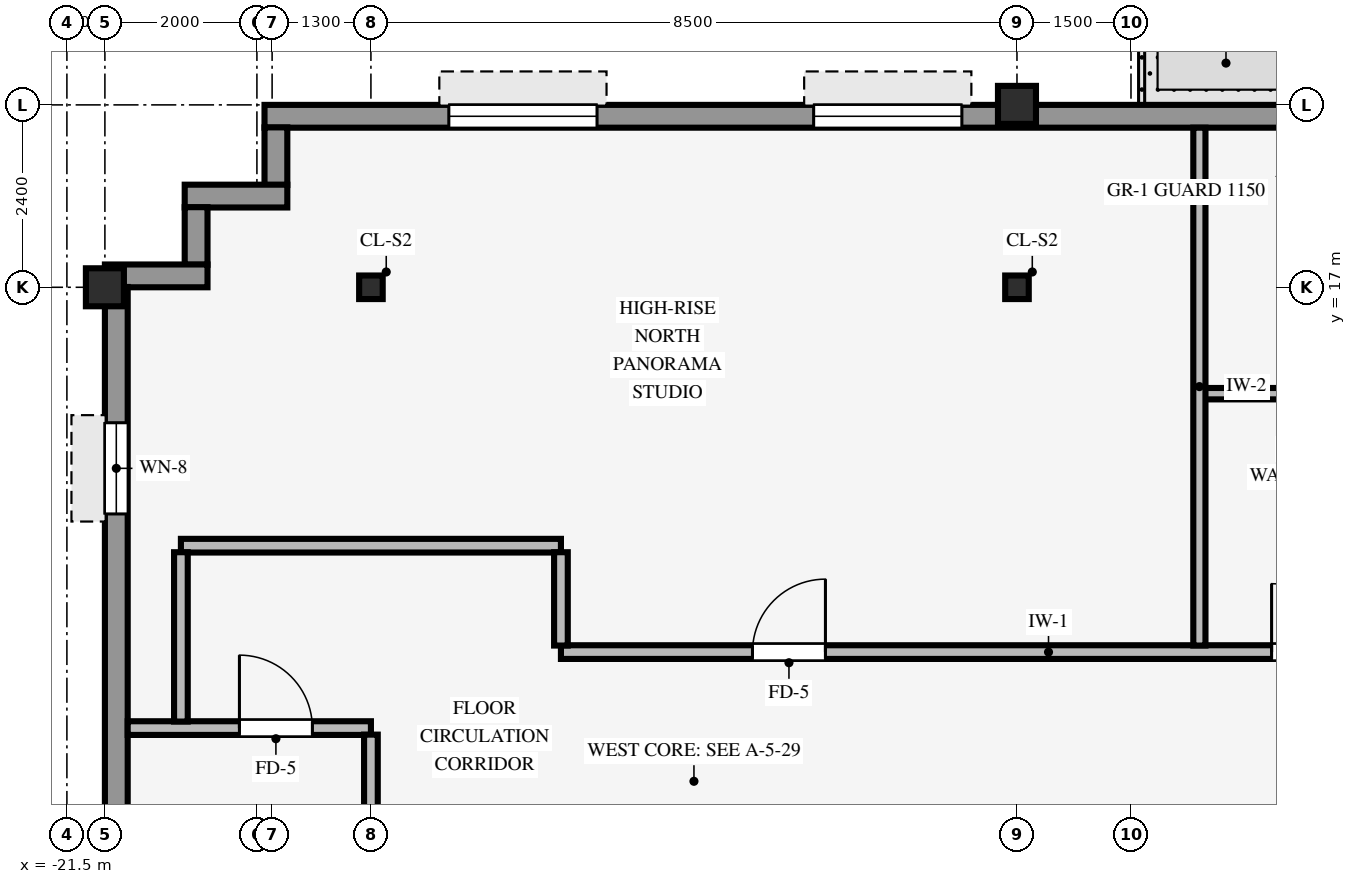
"""IFC4 building model, lengths in metres.
Left out: names, types, materials, properties, quantities, classifications, styles, units other than length and angle.
Written with IfcOpenShell. Run it as: python <this file> out.ifc"""

import sys

from ifc_helpers import new_model, si_unit, direction, frame, frame_2d, origin, origin_2d, place, context, subcontext, project, spatial, rectangle, hollow_rectangle, i_section, extrude, source, transform, mapped, element, fill, save


model = new_model("IFC4")
c1 = context("Model", 3, precision=1e-05, world=origin(), true_north=direction((0.0, 1.0)))
c2 = subcontext(c1, "Body", "Model", "MODEL_VIEW")
j1 = project(units=[si_unit("LENGTHUNIT", "METRE"), si_unit("PLANEANGLEUNIT", "RADIAN")], contexts=[c1])
p1 = place(None, origin())
s1 = spatial("IfcSite", under=j1, at=p1, CompositionType="ELEMENT")
p2 = place(p1, origin())
s2 = spatial("IfcBuilding", under=s1, at=p2, CompositionType="ELEMENT")
p3 = place(p2, frame((0.0, 0.0, 245.65)))
s3 = spatial("IfcBuildingStorey", under=s2, at=p3, CompositionType="ELEMENT", Elevation=245.65)
p4 = place(p3, frame((-21.0, 17.0, -0.4), z_axis=(0.0, 0.0, 1.0), x_axis=(1.0, 0.0, 0.0)))
e1 = element("IfcColumn", 1, at=p4, inside=s3, PredefinedType="COLUMN", context=c2, shape_type="SweptSolid", body=[
    extrude(hollow_rectangle(XDim=0.5, YDim=0.5, WallThickness=0.032, InnerFilletRadius=0.032, OuterFilletRadius=0.064, at=origin_2d()), origin(), (0.0, 0.0, 1.0), 3.77),
])
p5 = place(p3, frame((-9.0, 19.4, 0.0), z_axis=(0.0, 0.0, 1.0), x_axis=(1.0, 0.0, 0.0)))
e2 = element("IfcColumn", 2, at=p5, inside=s3, PredefinedType="COLUMN", context=c2, shape_type="SweptSolid", body=[
    extrude(hollow_rectangle(XDim=0.5, YDim=0.5, WallThickness=0.032, InnerFilletRadius=0.032, OuterFilletRadius=0.064, at=origin_2d()), origin(), (0.0, 0.0, 1.0), 3.37),
])
for number, where, z_axis, x_axis in (
    (3, (-17.5, 17.0, 0.0), (0.0, 0.0, 1.0), (1.0, 0.0, 0.0)),
    (4, (-9.0, 17.0, 0.0), (0.0, 0.0, 1.0), (1.0, 0.0, 0.0)),
):
    element("IfcColumn", number, at=place(p3, frame(where, z_axis=z_axis, x_axis=x_axis)), inside=s3, PredefinedType="COLUMN", context=c2, shape_type="SweptSolid", body=[
        extrude(i_section(OverallWidth=0.31, OverallDepth=0.31, WebThickness=0.015, FlangeThickness=0.015, FilletRadius=0.015, at=origin_2d()), origin(), (0.0, 0.0, 1.0), 3.37),
    ])
p6 = place(p3, frame((-18.9, 19.25, 0.0), z_axis=(0.0, 0.0, 1.0), x_axis=(1.0, 0.0, 0.0)))
e5 = element("IfcWall", 5, at=p6, inside=s3, PredefinedType="STANDARD", context=c2, shape_type="SweptSolid", body=[
    extrude(rectangle(XDim=35.6, YDim=0.3, at=frame_2d((17.8, 0.0))), origin(), (0.0, 0.0, 1.0), 2.705),
])
p7 = place(p6, frame((13.6, 0.0, 0.0)))
e6 = element("IfcOpeningElement", 6, at=p7, cuts=e5, PredefinedType="OPENING", context=c2, shape_type="SweptSolid", body=[
    extrude(rectangle(XDim=0.98, YDim=2.15, at=frame_2d((0.49, 1.075))), frame((0.0, 0.16, 0.0), z_axis=(0.0, -1.0, 0.0), x_axis=(1.0, 0.0, 0.0)), (0.0, 0.0, 1.0), 0.32),
])
p8 = place(p6, frame((2.425, 0.0, 0.8)))
e7 = element("IfcOpeningElement", 7, at=p8, cuts=e5, PredefinedType="OPENING", context=c2, shape_type="SweptSolid", body=[
    extrude(rectangle(XDim=1.95, YDim=1.48, at=frame_2d((0.975, 0.74))), frame((0.0, 0.16, 0.0), z_axis=(0.0, -1.0, 0.0), x_axis=(1.0, 0.0, 0.0)), (0.0, 0.0, 1.0), 0.32),
])
p9 = place(p6, frame((7.225, 0.0, 0.8)))
e8 = element("IfcOpeningElement", 8, at=p9, cuts=e5, PredefinedType="OPENING", context=c2, shape_type="SweptSolid", body=[
    extrude(rectangle(XDim=1.95, YDim=1.48, at=frame_2d((0.975, 0.74))), frame((0.0, 0.16, 0.0), z_axis=(0.0, -1.0, 0.0), x_axis=(1.0, 0.0, 0.0)), (0.0, 0.0, 1.0), 0.32),
])
p10 = place(p6, frame((15.925, 0.0, 0.8)))
e9 = element("IfcOpeningElement", 9, at=p10, cuts=e5, PredefinedType="OPENING", context=c2, shape_type="SweptSolid", body=[
    extrude(rectangle(XDim=1.95, YDim=1.48, at=frame_2d((0.975, 0.74))), frame((0.0, 0.16, 0.0), z_axis=(0.0, -1.0, 0.0), x_axis=(1.0, 0.0, 0.0)), (0.0, 0.0, 1.0), 0.32),
])
p11 = place(p6, frame((21.625, 0.0, 0.8)))
e10 = element("IfcOpeningElement", 10, at=p11, cuts=e5, PredefinedType="OPENING", context=c2, shape_type="SweptSolid", body=[
    extrude(rectangle(XDim=1.95, YDim=1.48, at=frame_2d((0.975, 0.74))), frame((0.0, 0.16, 0.0), z_axis=(0.0, -1.0, 0.0), x_axis=(1.0, 0.0, 0.0)), (0.0, 0.0, 1.0), 0.32),
])
p12 = place(p6, frame((32.125, 0.0, 0.8)))
e11 = element("IfcOpeningElement", 11, at=p12, cuts=e5, PredefinedType="OPENING", context=c2, shape_type="SweptSolid", body=[
    extrude(rectangle(XDim=1.95, YDim=1.48, at=frame_2d((0.975, 0.74))), frame((0.0, 0.16, 0.0), z_axis=(0.0, -1.0, 0.0), x_axis=(1.0, 0.0, 0.0)), (0.0, 0.0, 1.0), 0.32),
])
p13 = place(p3, frame((-18.75, 18.346, 0.0), z_axis=(0.0, 0.0, 1.0), x_axis=(0.0, 1.0, 0.0)))
e12 = element("IfcWall", 12, at=p13, inside=s3, PredefinedType="STANDARD", context=c2, shape_type="SweptSolid", body=[
    extrude(rectangle(XDim=0.758, YDim=0.3, at=frame_2d((0.379, 0.0))), origin(), (0.0, 0.0, 1.0), 2.892),
])
p14 = place(p3, frame((-19.95, 18.2, 0.0), z_axis=(0.0, 0.0, 1.0), x_axis=(1.0, 0.0, 0.0)))
e13 = element("IfcWall", 13, at=p14, inside=s3, PredefinedType="STANDARD", context=c2, shape_type="SweptSolid", body=[
    extrude(rectangle(XDim=1.35, YDim=0.3, at=frame_2d((0.675, 0.0))), origin(), (0.0, 0.0, 1.0), 2.892),
])
p15 = place(p3, frame((-19.8, 17.296, 0.0), z_axis=(0.0, 0.0, 1.0), x_axis=(0.0, 1.0, 0.0)))
e14 = element("IfcWall", 14, at=p15, inside=s3, PredefinedType="STANDARD", context=c2, shape_type="SweptSolid", body=[
    extrude(rectangle(XDim=0.758, YDim=0.3, at=frame_2d((0.379, 0.0))), origin(), (0.0, 0.0, 1.0), 2.892),
])
p16 = place(p3, frame((-21.0, 17.15, 0.0), z_axis=(0.0, 0.0, 1.0), x_axis=(1.0, 0.0, 0.0)))
e15 = element("IfcWall", 15, at=p16, inside=s3, PredefinedType="STANDARD", context=c2, shape_type="SweptSolid", body=[
    extrude(rectangle(XDim=1.35, YDim=0.3, at=frame_2d((0.675, 0.0))), origin(), (0.0, 0.0, 1.0), 2.892),
])
p17 = place(p3, frame((-20.85, -17.004, 0.0), z_axis=(0.0, 0.0, 1.0), x_axis=(0.0, 1.0, 0.0)))
e16 = element("IfcWall", 16, at=p17, inside=s3, PredefinedType="STANDARD", context=c2, shape_type="SweptSolid", body=[
    extrude(rectangle(XDim=34.008, YDim=0.3, at=frame_2d((17.004, 0.0))), origin(), (0.0, 0.0, 1.0), 2.705),
])
p18 = place(p17, frame((11.754, 0.0, 0.0)))
e17 = element("IfcOpeningElement", 17, at=p18, cuts=e16, PredefinedType="OPENING", context=c2, shape_type="SweptSolid", body=[
    extrude(rectangle(XDim=1.05, YDim=2.1, at=frame_2d((0.525, 1.05))), frame((0.0, 0.16, 0.0), z_axis=(0.0, -1.0, 0.0), x_axis=(1.0, 0.0, 0.0)), (0.0, 0.0, 1.0), 0.32),
])
p19 = place(p17, frame((1.786, 0.0, 0.8)))
e18 = element("IfcOpeningElement", 18, at=p19, cuts=e16, PredefinedType="OPENING", context=c2, shape_type="SweptSolid", body=[
    extrude(rectangle(XDim=1.2, YDim=1.48, at=frame_2d((0.6, 0.74))), frame((0.0, 0.16, 0.0), z_axis=(0.0, -1.0, 0.0), x_axis=(1.0, 0.0, 0.0)), (0.0, 0.0, 1.0), 0.32),
])
p20 = place(p17, frame((8.159, 0.0, 0.8)))
e19 = element("IfcOpeningElement", 19, at=p20, cuts=e16, PredefinedType="OPENING", context=c2, shape_type="SweptSolid", body=[
    extrude(rectangle(XDim=1.2, YDim=1.48, at=frame_2d((0.6, 0.74))), frame((0.0, 0.16, 0.0), z_axis=(0.0, -1.0, 0.0), x_axis=(1.0, 0.0, 0.0)), (0.0, 0.0, 1.0), 0.32),
])
p21 = place(p17, frame((13.181, 0.0, 0.8)))
e20 = element("IfcOpeningElement", 20, at=p21, cuts=e16, PredefinedType="OPENING", context=c2, shape_type="SweptSolid", body=[
    extrude(rectangle(XDim=1.2, YDim=1.48, at=frame_2d((0.6, 0.74))), frame((0.0, 0.16, 0.0), z_axis=(0.0, -1.0, 0.0), x_axis=(1.0, 0.0, 0.0)), (0.0, 0.0, 1.0), 0.32),
])
p22 = place(p17, frame((17.754, 0.0, 0.8)))
e21 = element("IfcOpeningElement", 21, at=p22, cuts=e16, PredefinedType="OPENING", context=c2, shape_type="SweptSolid", body=[
    extrude(rectangle(XDim=1.2, YDim=1.48, at=frame_2d((0.6, 0.74))), frame((0.0, 0.16, 0.0), z_axis=(0.0, -1.0, 0.0), x_axis=(1.0, 0.0, 0.0)), (0.0, 0.0, 1.0), 0.32),
])
p23 = place(p17, frame((20.977, 0.0, 0.8)))
e22 = element("IfcOpeningElement", 22, at=p23, cuts=e16, PredefinedType="OPENING", context=c2, shape_type="SweptSolid", body=[
    extrude(rectangle(XDim=1.2, YDim=1.48, at=frame_2d((0.6, 0.74))), frame((0.0, 0.16, 0.0), z_axis=(0.0, -1.0, 0.0), x_axis=(1.0, 0.0, 0.0)), (0.0, 0.0, 1.0), 0.32),
])
p24 = place(p17, frame((24.649, 0.0, 0.8)))
e23 = element("IfcOpeningElement", 23, at=p24, cuts=e16, PredefinedType="OPENING", context=c2, shape_type="SweptSolid", body=[
    extrude(rectangle(XDim=1.2, YDim=1.48, at=frame_2d((0.6, 0.74))), frame((0.0, 0.16, 0.0), z_axis=(0.0, -1.0, 0.0), x_axis=(1.0, 0.0, 0.0)), (0.0, 0.0, 1.0), 0.32),
])
p25 = place(p17, frame((31.022, 0.0, 0.8)))
e24 = element("IfcOpeningElement", 24, at=p25, cuts=e16, PredefinedType="OPENING", context=c2, shape_type="SweptSolid", body=[
    extrude(rectangle(XDim=1.2, YDim=1.48, at=frame_2d((0.6, 0.74))), frame((0.0, 0.16, 0.0), z_axis=(0.0, -1.0, 0.0), x_axis=(1.0, 0.0, 0.0)), (0.0, 0.0, 1.0), 0.32),
])
p26 = place(p3, frame((-20.7, 11.2, 0.0), z_axis=(0.0, 0.0, 1.0), x_axis=(1.0, 0.0, 0.0)))
e25 = element("IfcWall", 25, at=p26, inside=s3, PredefinedType="PARTITIONING", context=c2, shape_type="SweptSolid", body=[
    extrude(rectangle(XDim=3.2, YDim=0.18, at=frame_2d((1.6, 0.0))), origin(), (0.0, 0.0, 1.0), 3.36),
])
p27 = place(p26, frame((1.47, 0.0, 0.0)))
e26 = element("IfcOpeningElement", 26, at=p27, cuts=e25, PredefinedType="OPENING", context=c2, shape_type="SweptSolid", body=[
    extrude(rectangle(XDim=0.96, YDim=2.1, at=frame_2d((0.48, 1.05))), frame((0.0, 0.1, 0.0), z_axis=(0.0, -1.0, 0.0), x_axis=(1.0, 0.0, 0.0)), (0.0, 0.0, 1.0), 0.2),
])
p28 = place(p3, frame((-15.0, 12.2, 0.0), z_axis=(0.0, 0.0, 1.0), x_axis=(1.0, 0.0, 0.0)))
e27 = element("IfcWall", 27, at=p28, inside=s3, PredefinedType="PARTITIONING", context=c2, shape_type="SweptSolid", body=[
    extrude(rectangle(XDim=30.8, YDim=0.18, at=frame_2d((15.4, 0.0))), origin(), (0.0, 0.0, 1.0), 3.36),
])
p29 = place(p28, frame((2.52, 0.0, 0.0)))
e28 = element("IfcOpeningElement", 28, at=p29, cuts=e27, PredefinedType="OPENING", context=c2, shape_type="SweptSolid", body=[
    extrude(rectangle(XDim=0.96, YDim=2.1, at=frame_2d((0.48, 1.05))), frame((0.0, 0.1, 0.0), z_axis=(0.0, -1.0, 0.0), x_axis=(1.0, 0.0, 0.0)), (0.0, 0.0, 1.0), 0.2),
])
p30 = place(p28, frame((19.22, 0.0, 0.0)))
e29 = element("IfcOpeningElement", 29, at=p30, cuts=e27, PredefinedType="OPENING", context=c2, shape_type="SweptSolid", body=[
    extrude(rectangle(XDim=0.96, YDim=2.1, at=frame_2d((0.48, 1.05))), frame((0.0, 0.1, 0.0), z_axis=(0.0, -1.0, 0.0), x_axis=(1.0, 0.0, 0.0)), (0.0, 0.0, 1.0), 0.2),
])
p31 = place(p28, frame((25.32, 0.0, 0.0)))
e30 = element("IfcOpeningElement", 30, at=p31, cuts=e27, PredefinedType="OPENING", context=c2, shape_type="SweptSolid", body=[
    extrude(rectangle(XDim=0.96, YDim=2.1, at=frame_2d((0.48, 1.05))), frame((0.0, 0.1, 0.0), z_axis=(0.0, -1.0, 0.0), x_axis=(1.0, 0.0, 0.0)), (0.0, 0.0, 1.0), 0.2),
])
p32 = place(p28, frame((28.72, 0.0, 0.0)))
e31 = element("IfcOpeningElement", 31, at=p32, cuts=e27, PredefinedType="OPENING", context=c2, shape_type="SweptSolid", body=[
    extrude(rectangle(XDim=0.96, YDim=2.1, at=frame_2d((0.48, 1.05))), frame((0.0, 0.1, 0.0), z_axis=(0.0, -1.0, 0.0), x_axis=(1.0, 0.0, 0.0)), (0.0, 0.0, 1.0), 0.2),
])
p33 = place(p28, frame((9.35, 0.0, 0.0)))
e32 = element("IfcOpeningElement", 32, at=p33, cuts=e27, PredefinedType="OPENING", context=c2, shape_type="SweptSolid", body=[
    extrude(rectangle(XDim=0.9, YDim=2.1, at=frame_2d((0.45, 1.05))), frame((0.0, 0.1, 0.0), z_axis=(0.0, -1.0, 0.0), x_axis=(1.0, 0.0, 0.0)), (0.0, 0.0, 1.0), 0.2),
])
p34 = place(p28, frame((12.15, 0.0, 0.0)))
e33 = element("IfcOpeningElement", 33, at=p34, cuts=e27, PredefinedType="OPENING", context=c2, shape_type="SweptSolid", body=[
    extrude(rectangle(XDim=0.9, YDim=2.1, at=frame_2d((0.45, 1.05))), frame((0.0, 0.1, 0.0), z_axis=(0.0, -1.0, 0.0), x_axis=(1.0, 0.0, 0.0)), (0.0, 0.0, 1.0), 0.2),
])
p35 = place(p28, frame((16.25, 0.0, 0.0)))
e34 = element("IfcOpeningElement", 34, at=p35, cuts=e27, PredefinedType="OPENING", context=c2, shape_type="SweptSolid", body=[
    extrude(rectangle(XDim=0.9, YDim=2.1, at=frame_2d((0.45, 1.05))), frame((0.0, 0.1, 0.0), z_axis=(0.0, -1.0, 0.0), x_axis=(1.0, 0.0, 0.0)), (0.0, 0.0, 1.0), 0.2),
])
p36 = place(p3, frame((-20.0, 13.6, 0.0), z_axis=(0.0, 0.0, 1.0), x_axis=(1.0, 0.0, 0.0)))
e35 = element("IfcWall", 35, at=p36, inside=s3, PredefinedType="PARTITIONING", context=c2, shape_type="SweptSolid", body=[
    extrude(rectangle(XDim=5.0, YDim=0.18, at=frame_2d((2.5, 0.0))), origin(), (0.0, 0.0, 1.0), 3.049),
])
p37 = place(p3, frame((-6.529, 15.6, 0.0), z_axis=(0.0, 0.0, 1.0), x_axis=(1.0, 0.0, 0.0)))
e36 = element("IfcWall", 36, at=p37, inside=s3, PredefinedType="PARTITIONING", context=c2, shape_type="SweptSolid", body=[
    extrude(rectangle(XDim=5.529, YDim=0.15, at=frame_2d((2.765, 0.0))), origin(), (0.0, 0.0, 1.0), 3.36),
])
p38 = place(p3, frame((-20.0, 11.286, 0.0), z_axis=(0.0, 0.0, 1.0), x_axis=(0.0, 1.0, 0.0)))
e37 = element("IfcWall", 37, at=p38, inside=s3, PredefinedType="PARTITIONING", context=c2, shape_type="SweptSolid", body=[
    extrude(rectangle(XDim=2.228, YDim=0.18, at=frame_2d((1.114, 0.0))), origin(), (0.0, 0.0, 1.0), 3.36),
])
p39 = place(p3, frame((-17.5, 9.996, 0.0), z_axis=(0.0, 0.0, 1.0), x_axis=(0.0, 1.0, 0.0)))
e38 = element("IfcWall", 38, at=p39, inside=s3, PredefinedType="PARTITIONING", context=c2, shape_type="SweptSolid", body=[
    extrude(rectangle(XDim=1.118, YDim=0.18, at=frame_2d((0.559, 0.0))), origin(), (0.0, 0.0, 1.0), 2.892),
])
p40 = place(p3, frame((-15.0, 12.286, 0.0), z_axis=(0.0, 0.0, 1.0), x_axis=(0.0, 1.0, 0.0)))
e39 = element("IfcWall", 39, at=p40, inside=s3, PredefinedType="PARTITIONING", context=c2, shape_type="SweptSolid", body=[
    extrude(rectangle(XDim=1.228, YDim=0.18, at=frame_2d((0.614, 0.0))), origin(), (0.0, 0.0, 1.0), 3.36),
])
p41 = place(p3, frame((-6.6, 12.286, 0.0), z_axis=(0.0, 0.0, 1.0), x_axis=(0.0, 1.0, 0.0)))
e40 = element("IfcWall", 40, at=p41, inside=s3, PredefinedType="PARTITIONING", context=c2, shape_type="SweptSolid", body=[
    extrude(rectangle(XDim=6.814, YDim=0.16, at=frame_2d((3.407, 0.0))), origin(), (0.0, 0.0, 1.0), 3.36),
])
m1 = source(origin(), c2, "Body", "SweptSolid", [
    extrude(rectangle(XDim=1.95, YDim=1.48, at=frame_2d((0.975, 0.74))), frame((0.0, 0.03, 0.0), z_axis=(0.0, -1.0, 0.0), x_axis=(1.0, 0.0, 0.0)), (0.0, 0.0, 1.0), 0.06),
])
p42 = place(p8, origin())
e41 = element("IfcWindow", 41, at=p42, inside=s3, PartitioningType="SINGLE_PANEL", PredefinedType="WINDOW", context=c2, shape_type="MappedRepresentation", body=[
    mapped(m1, transform((0.0, 0.0, 0.0), scale=1.0)),
])
fill(e7, e41)
p43 = place(p9, origin())
e42 = element("IfcWindow", 42, at=p43, inside=s3, PartitioningType="SINGLE_PANEL", PredefinedType="WINDOW", context=c2, shape_type="MappedRepresentation", body=[
    mapped(m1, transform((0.0, 0.0, 0.0), scale=1.0)),
])
fill(e8, e42)
m2 = source(origin(), c2, "Body", "SweptSolid", [
    extrude(rectangle(XDim=1.2, YDim=1.48, at=frame_2d((0.6, 0.74))), frame((0.0, 0.03, 0.0), z_axis=(0.0, -1.0, 0.0), x_axis=(1.0, 0.0, 0.0)), (0.0, 0.0, 1.0), 0.06),
])
p44 = place(p25, origin())
e43 = element("IfcWindow", 43, at=p44, inside=s3, PartitioningType="SINGLE_PANEL", PredefinedType="WINDOW", context=c2, shape_type="MappedRepresentation", body=[
    mapped(m2, transform((0.0, 0.0, 0.0), scale=1.0)),
])
fill(e24, e43)
m3 = source(origin(), c2, "Body", "SweptSolid", [
    extrude(rectangle(XDim=0.96, YDim=2.1, at=frame_2d((0.48, 1.05))), frame((0.0, 0.025, 0.0), z_axis=(0.0, -1.0, 0.0), x_axis=(1.0, 0.0, 0.0)), (0.0, 0.0, 1.0), 0.05),
])
p45 = place(p29, origin())
e44 = element("IfcDoor", 44, at=p45, inside=s3, OperationType="SINGLE_SWING_RIGHT", PredefinedType="DOOR", context=c2, shape_type="MappedRepresentation", body=[
    mapped(m3, transform((0.0, 0.0, 0.0), scale=1.0)),
])
fill(e28, e44)
m4 = source(origin(), c2, "Body", "SweptSolid", [
    extrude(rectangle(XDim=0.9, YDim=2.1, at=frame_2d((0.45, 1.05))), frame((0.0, 0.025, 0.0), z_axis=(0.0, -1.0, 0.0), x_axis=(1.0, 0.0, 0.0)), (0.0, 0.0, 1.0), 0.05),
])
p46 = place(p33, origin())
e45 = element("IfcDoor", 45, at=p46, inside=s3, OperationType="SINGLE_SWING_LEFT", PredefinedType="DOOR", context=c2, shape_type="MappedRepresentation", body=[
    mapped(m4, transform((0.0, 0.0, 0.0), scale=1.0)),
])
fill(e32, e45)
p47 = place(p27, origin())
e46 = element("IfcDoor", 46, at=p47, inside=s3, OperationType="SINGLE_SWING_LEFT", PredefinedType="DOOR", context=c2, shape_type="MappedRepresentation", body=[
    mapped(m3, transform((0.0, 0.0, 0.0), scale=1.0)),
])
fill(e26, e46)
save(model, sys.argv[1])
